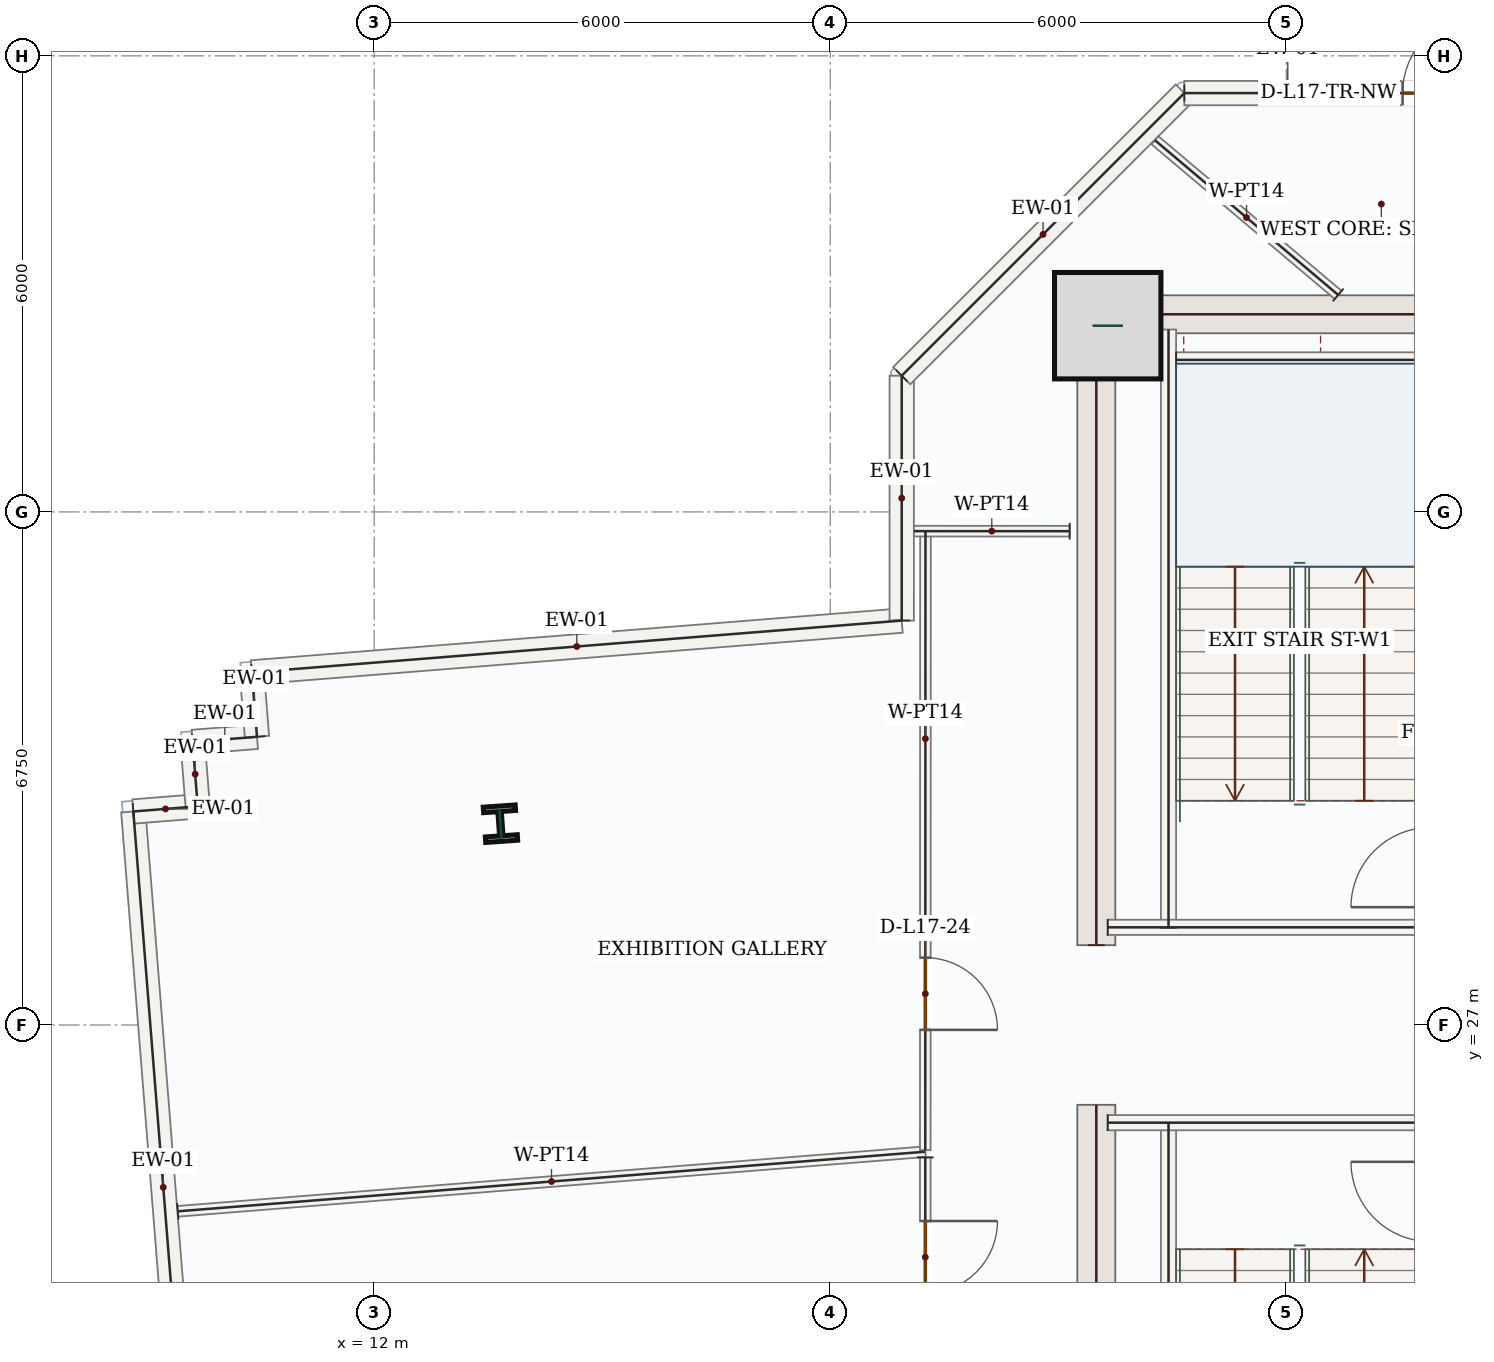
"""IFC4 building model, lengths in metres.
Left out: names, types, materials, properties, quantities, classifications, styles, units other than length and angle.
Written with IfcOpenShell. Run it as: python <this file> out.ifc"""

import sys

from ifc_helpers import new_model, si_unit, direction, frame, frame_2d, origin, origin_2d, place, context, subcontext, project, spatial, rectangle, i_section, extrude, source, transform, mapped, element, fill, save


model = new_model("IFC4")
c1 = context("Model", 3, precision=1e-05, world=origin(), true_north=direction((0.0, 1.0)))
c2 = subcontext(c1, "Body", "Model", "MODEL_VIEW")
j1 = project(units=[si_unit("LENGTHUNIT", "METRE"), si_unit("PLANEANGLEUNIT", "RADIAN")], contexts=[c1])
p1 = place(None, origin())
s1 = spatial("IfcSite", under=j1, at=p1, CompositionType="ELEMENT")
p2 = place(p1, origin())
s2 = spatial("IfcBuilding", under=s1, at=p2, CompositionType="ELEMENT")
p3 = place(p2, frame((0.0, 0.0, 79.5)))
s3 = spatial("IfcBuildingStorey", under=s2, at=p3, CompositionType="ELEMENT", Elevation=79.5)
m1 = source(origin(), c2, "Body", "SweptSolid", [
    extrude(rectangle(XDim=8.55, YDim=0.5, at=frame_2d((4.275, 0.0))), origin(), (0.0, 0.0, 1.0), 3.95),
])
for number, where, z_axis, x_axis in (
    (1, (21.5, 17.4, 0.0), (0.0, 0.0, 1.0), (0.0, 1.0, 0.0)),
    (2, (21.5, 28.05, 0.0), (0.0, 0.0, 1.0), (0.0, 1.0, 0.0)),
):
    element("IfcWall", number, at=place(p3, frame(where, z_axis=z_axis, x_axis=x_axis)), inside=s3, PredefinedType="SHEAR", context=c2, shape_type="MappedRepresentation", body=[
        mapped(m1, transform((0.0, 0.0, 0.0), x_axis=(1.0, 0.0, 0.0), y_axis=(0.0, 1.0, 0.0), z_axis=(0.0, 0.0, 1.0), scale=1.0)),
    ])
m2 = source(origin(), c2, "Body", "SweptSolid", [
    extrude(rectangle(XDim=7.0, YDim=0.5, at=frame_2d((3.5, 0.0))), origin(), (0.0, 0.0, 1.0), 3.95),
])
p4 = place(p3, frame((21.75, 36.35, 0.0), z_axis=(0.0, 0.0, 1.0), x_axis=(1.0, 0.0, 0.0)))
e3 = element("IfcWall", 3, at=p4, inside=s3, PredefinedType="SHEAR", context=c2, shape_type="MappedRepresentation", body=[
    mapped(m2, transform((0.0, 0.0, 0.0), x_axis=(1.0, 0.0, 0.0), y_axis=(0.0, 1.0, 0.0), z_axis=(0.0, 0.0, 1.0), scale=1.0)),
])
m3 = source(origin(), c2, "Body", "SweptSolid", [
    extrude(rectangle(XDim=1.4, YDim=1.4, at=origin_2d()), origin(), (0.0, 0.0, 1.0), 4.2),
])
p5 = place(p3, frame((21.65, 36.2, 0.0), z_axis=(0.0, 0.0, 1.0), x_axis=(1.0, 0.0, 0.0)))
e4 = element("IfcColumn", 4, at=p5, inside=s3, PredefinedType="COLUMN", context=c2, shape_type="MappedRepresentation", body=[
    mapped(m3, transform((0.0, 0.0, 0.0), x_axis=(1.0, 0.0, 0.0), y_axis=(0.0, 1.0, 0.0), z_axis=(0.0, 0.0, 1.0), scale=1.0)),
])
m4 = source(origin(), c2, "Body", "SweptSolid", [
    extrude(i_section(OverallWidth=0.421, OverallDepth=0.465, WebThickness=0.045, FlangeThickness=0.073, FilletRadius=0.018, at=origin_2d()), origin(), (0.0, 0.0, 1.0), 4.2),
])
p6 = place(p3, frame((13.661, 29.648, 0.0), z_axis=(0.0, 0.0, 1.0), x_axis=(0.99756405026, 0.069756473744, 0.0)))
e5 = element("IfcColumn", 5, at=p6, inside=s3, PredefinedType="COLUMN", context=c2, shape_type="MappedRepresentation", body=[
    mapped(m4, transform((0.0, 0.0, 0.0), x_axis=(1.0, 0.0, 0.0), y_axis=(0.0, 1.0, 0.0), z_axis=(0.0, 0.0, 1.0), scale=1.0)),
])
m5 = source(origin(), c2, "Body", "SweptSolid", [
    extrude(rectangle(XDim=9.92, YDim=0.32, at=frame_2d((4.96, 0.0))), origin(), (0.0, 0.0, 1.0), 3.95),
])
p7 = place(p3, frame((9.619, 19.92, 0.0), z_axis=(0.0, 0.0, 1.0), x_axis=(-0.07949480177, 0.996835280521, 0.0)))
e6 = element("IfcWall", 6, at=p7, inside=s3, PredefinedType="SOLIDWALL", context=c2, shape_type="MappedRepresentation", body=[
    mapped(m5, transform((0.0, 0.0, 0.0), x_axis=(1.0, 0.0, 0.0), y_axis=(0.0, 1.0, 0.0), z_axis=(0.0, 0.0, 1.0), scale=1.0)),
])
m6 = source(origin(), c2, "Body", "SweptSolid", [
    extrude(rectangle(XDim=0.85, YDim=0.32, at=frame_2d((0.425, 0.0))), origin(), (0.0, 0.0, 1.0), 3.95),
])
p8 = place(p3, frame((8.831, 29.809, 0.0), z_axis=(0.0, 0.0, 1.0), x_axis=(0.996828965123, 0.079573954853, 0.0)))
e7 = element("IfcWall", 7, at=p8, inside=s3, PredefinedType="SOLIDWALL", context=c2, shape_type="MappedRepresentation", body=[
    mapped(m6, transform((0.0, 0.0, 0.0), x_axis=(1.0, 0.0, 0.0), y_axis=(0.0, 1.0, 0.0), z_axis=(0.0, 0.0, 1.0), scale=1.0)),
])
m7 = source(origin(), c2, "Body", "SweptSolid", [
    extrude(rectangle(XDim=0.85, YDim=0.32, at=frame_2d((0.425, 0.0))), origin(), (0.0, 0.0, 1.0), 3.95),
])
for number, where, z_axis, x_axis in (
    (8, (9.678, 29.876, 0.0), (0.0, 0.0, 1.0), (-0.08, 0.997, 0.0)),
    (9, (9.61, 30.724, 0.0), (0.0, 0.0, 1.0), (0.997, 0.079, 0.0)),
    (10, (10.458, 30.791, 0.0), (0.0, 0.0, 1.0), (-0.08, 0.997, 0.0)),
):
    element("IfcWall", number, at=place(p3, frame(where, z_axis=z_axis, x_axis=x_axis)), inside=s3, PredefinedType="SOLIDWALL", context=c2, shape_type="MappedRepresentation", body=[
        mapped(m7, transform((0.0, 0.0, 0.0), x_axis=(1.0, 0.0, 0.0), y_axis=(0.0, 1.0, 0.0), z_axis=(0.0, 0.0, 1.0), scale=1.0)),
    ])
m8 = source(origin(), c2, "Body", "SweptSolid", [
    extrude(rectangle(XDim=8.577, YDim=0.32, at=frame_2d((4.289, 0.0))), origin(), (0.0, 0.0, 1.0), 3.95),
])
p9 = place(p3, frame((10.39, 31.639, 0.0), z_axis=(0.0, 0.0, 1.0), x_axis=(0.996834708052, 0.07950198, 0.0)))
e11 = element("IfcWall", 11, at=p9, inside=s3, PredefinedType="SOLIDWALL", context=c2, shape_type="MappedRepresentation", body=[
    mapped(m8, transform((0.0, 0.0, 0.0), x_axis=(1.0, 0.0, 0.0), y_axis=(0.0, 1.0, 0.0), z_axis=(0.0, 0.0, 1.0), scale=1.0)),
])
m9 = source(origin(), c2, "Body", "SweptSolid", [
    extrude(rectangle(XDim=3.221, YDim=0.32, at=frame_2d((1.611, 0.0))), origin(), (0.0, 0.0, 1.0), 3.95),
])
p10 = place(p3, frame((18.94, 32.321, 0.0), z_axis=(0.0, 0.0, 1.0), x_axis=(0.0, 1.0, 0.0)))
e12 = element("IfcWall", 12, at=p10, inside=s3, PredefinedType="SOLIDWALL", context=c2, shape_type="MappedRepresentation", body=[
    mapped(m9, transform((0.0, 0.0, 0.0), x_axis=(1.0, 0.0, 0.0), y_axis=(0.0, 1.0, 0.0), z_axis=(0.0, 0.0, 1.0), scale=1.0)),
])
m10 = source(origin(), c2, "Body", "SweptSolid", [
    extrude(rectangle(XDim=5.258, YDim=0.32, at=frame_2d((2.629, 0.0))), origin(), (0.0, 0.0, 1.0), 3.95),
])
p11 = place(p3, frame((18.94, 35.542, 0.0), z_axis=(0.0, 0.0, 1.0), x_axis=(0.707106781187, 0.707106781187, 0.0)))
e13 = element("IfcWall", 13, at=p11, inside=s3, PredefinedType="SOLIDWALL", context=c2, shape_type="MappedRepresentation", body=[
    mapped(m10, transform((0.0, 0.0, 0.0), x_axis=(1.0, 0.0, 0.0), y_axis=(0.0, 1.0, 0.0), z_axis=(0.0, 0.0, 1.0), scale=1.0)),
])
p12 = place(p3, frame((22.658, 39.26, 0.0), z_axis=(0.0, 0.0, 1.0), x_axis=(1.0, 0.0, 0.0)))
e14 = element("IfcWall", 14, at=p12, inside=s3, PredefinedType="SOLIDWALL", context=c2, shape_type="SweptSolid", body=[
    extrude(rectangle(XDim=5.683, YDim=0.32, at=frame_2d((2.842, 0.0))), origin(), (0.0, 0.0, 1.0), 3.95),
])
p13 = place(p12, frame((2.872, 0.0, 0.0)))
e15 = element("IfcOpeningElement", 15, at=p13, cuts=e14, PredefinedType="OPENING", context=c2, shape_type="SweptSolid", body=[
    extrude(rectangle(XDim=1.05, YDim=2.15, at=frame_2d((0.525, 1.075))), frame((0.0, 0.17, 0.0), z_axis=(0.0, -1.0, 0.0), x_axis=(1.0, 0.0, 0.0)), (0.0, 0.0, 1.0), 0.34),
])
m11 = source(origin(), c2, "Body", "SweptSolid", [
    extrude(rectangle(XDim=7.87, YDim=0.2, at=frame_2d((3.935, 0.0))), origin(), (0.0, 0.0, 1.0), 3.95),
])
for number, where, z_axis, x_axis in (
    (16, (22.45, 17.85, 0.0), (0.0, 0.0, 1.0), (0.0, 1.0, 0.0)),
    (17, (22.45, 28.28, 0.0), (0.0, 0.0, 1.0), (0.0, 1.0, 0.0)),
):
    element("IfcWall", number, at=place(p3, frame(where, z_axis=z_axis, x_axis=x_axis)), inside=s3, PredefinedType="SOLIDWALL", context=c2, shape_type="MappedRepresentation", body=[
        mapped(m11, transform((0.0, 0.0, 0.0), x_axis=(1.0, 0.0, 0.0), y_axis=(0.0, 1.0, 0.0), z_axis=(0.0, 0.0, 1.0), scale=1.0)),
    ])
m12 = source(origin(), c2, "Body", "SweptSolid", [
    extrude(rectangle(XDim=4.25, YDim=0.2, at=frame_2d((2.125, 0.0))), origin(), (0.0, 0.0, 1.0), 3.95),
])
for number, where, z_axis, x_axis in (
    (18, (21.65, 25.715, 0.0), (0.0, 0.0, 1.0), (1.0, 0.0, 0.0)),
    (19, (21.65, 28.285, 0.0), (0.0, 0.0, 1.0), (1.0, 0.0, 0.0)),
):
    element("IfcWall", number, at=place(p3, frame(where, z_axis=z_axis, x_axis=x_axis)), inside=s3, PredefinedType="SOLIDWALL", context=c2, shape_type="MappedRepresentation", body=[
        mapped(m12, transform((0.0, 0.0, 0.0), x_axis=(1.0, 0.0, 0.0), y_axis=(0.0, 1.0, 0.0), z_axis=(0.0, 0.0, 1.0), scale=1.0)),
    ])
m13 = source(origin(), c2, "Body", "SweptSolid", [
    extrude(rectangle(XDim=3.25, YDim=0.2, at=frame_2d((1.625, 0.0))), origin(), (0.0, 0.0, 1.0), 3.95),
])
p14 = place(p3, frame((22.55, 35.75, 0.0), z_axis=(0.0, 0.0, 1.0), x_axis=(1.0, 0.0, 0.0)))
e20 = element("IfcWall", 20, at=p14, inside=s3, PredefinedType="SOLIDWALL", context=c2, shape_type="MappedRepresentation", body=[
    mapped(m13, transform((0.0, 0.0, 0.0), x_axis=(1.0, 0.0, 0.0), y_axis=(0.0, 1.0, 0.0), z_axis=(0.0, 0.0, 1.0), scale=1.0)),
])
m14 = source(origin(), c2, "Body", "SweptSolid", [
    extrude(rectangle(XDim=3.155, YDim=0.14, at=frame_2d((1.577, 0.0))), origin(), (0.0, 0.0, 1.0), 3.95),
])
p15 = place(p3, frame((24.682, 36.605, 0.0), z_axis=(0.0, 0.0, 1.0), x_axis=(-0.76411384058, 0.645081420159, 0.0)))
e21 = element("IfcWall", 21, at=p15, inside=s3, PredefinedType="PARTITIONING", context=c2, shape_type="MappedRepresentation", body=[
    mapped(m14, transform((0.0, 0.0, 0.0), x_axis=(1.0, 0.0, 0.0), y_axis=(0.0, 1.0, 0.0), z_axis=(0.0, 0.0, 1.0), scale=1.0)),
])
m15 = source(origin(), c2, "Body", "SweptSolid", [
    extrude(rectangle(XDim=9.865, YDim=0.14, at=frame_2d((4.933, 0.0))), origin(), (0.0, 0.0, 1.0), 3.95),
])
p16 = place(p3, frame((9.416, 24.549, 0.0), z_axis=(0.0, 0.0, 1.0), x_axis=(0.996833900052, 0.079512110446, 0.0)))
e22 = element("IfcWall", 22, at=p16, inside=s3, PredefinedType="PARTITIONING", context=c2, shape_type="MappedRepresentation", body=[
    mapped(m15, transform((0.0, 0.0, 0.0), x_axis=(1.0, 0.0, 0.0), y_axis=(0.0, 1.0, 0.0), z_axis=(0.0, 0.0, 1.0), scale=1.0)),
])
p17 = place(p3, frame((19.25, 25.258, 0.0), z_axis=(0.0, 0.0, 1.0), x_axis=(0.000102701037, -0.999999994726, 0.0)))
e23 = element("IfcWall", 23, at=p17, inside=s3, PredefinedType="PARTITIONING", context=c2, shape_type="SweptSolid", body=[
    extrude(rectangle(XDim=4.754, YDim=0.14, at=frame_2d((2.377, 0.0))), origin(), (0.0, 0.0, 1.0), 3.95),
])
p18 = place(p17, frame((0.837, 0.0, 0.0)))
e24 = element("IfcOpeningElement", 24, at=p18, cuts=e23, PredefinedType="OPENING", context=c2, shape_type="SweptSolid", body=[
    extrude(rectangle(XDim=0.95, YDim=2.15, at=frame_2d((0.475, 1.075))), frame((0.0, 0.08, 0.0), z_axis=(0.0, -1.0, 0.0), x_axis=(1.0, 0.0, 0.0)), (0.0, 0.0, 1.0), 0.16),
])
p19 = place(p3, frame((19.253, 33.497, 0.0), z_axis=(0.0, 0.0, 1.0), x_axis=(-0.000329746078, -0.999999945634, 0.0)))
e25 = element("IfcWall", 25, at=p19, inside=s3, PredefinedType="PARTITIONING", context=c2, shape_type="SweptSolid", body=[
    extrude(rectangle(XDim=8.144, YDim=0.14, at=frame_2d((4.072, 0.0))), origin(), (0.0, 0.0, 1.0), 3.95),
])
p20 = place(p19, frame((5.611, 0.0, 0.0)))
e26 = element("IfcOpeningElement", 26, at=p20, cuts=e25, PredefinedType="OPENING", context=c2, shape_type="SweptSolid", body=[
    extrude(rectangle(XDim=0.95, YDim=2.15, at=frame_2d((0.475, 1.075))), frame((0.0, 0.08, 0.0), z_axis=(0.0, -1.0, 0.0), x_axis=(1.0, 0.0, 0.0)), (0.0, 0.0, 1.0), 0.16),
])
m16 = source(origin(), c2, "Body", "SweptSolid", [
    extrude(rectangle(XDim=2.049, YDim=0.14, at=frame_2d((1.025, 0.0))), origin(), (0.0, 0.0, 1.0), 3.95),
])
p21 = place(p3, frame((21.149, 33.497, 0.0), z_axis=(0.0, 0.0, 1.0), x_axis=(-0.999999936133, 0.000357398119, 0.0)))
e27 = element("IfcWall", 27, at=p21, inside=s3, PredefinedType="PARTITIONING", context=c2, shape_type="MappedRepresentation", body=[
    mapped(m16, transform((0.0, 0.0, 0.0), x_axis=(1.0, 0.0, 0.0), y_axis=(0.0, 1.0, 0.0), z_axis=(0.0, 0.0, 1.0), scale=1.0)),
])
m17 = source(origin(), c2, "Body", "SweptSolid", [
    extrude(rectangle(XDim=1.05, YDim=2.15, at=frame_2d((0.525, 1.075))), frame((0.0, 0.025, 0.0), z_axis=(0.0, -1.0, 0.0), x_axis=(1.0, 0.0, 0.0)), (0.0, 0.0, 1.0), 0.05),
])
p22 = place(p13, origin())
e28 = element("IfcDoor", 28, at=p22, inside=s3, OperationType="SINGLE_SWING_RIGHT", PredefinedType="DOOR", context=c2, shape_type="MappedRepresentation", body=[
    mapped(m17, transform((0.0, 0.0, 0.0), x_axis=(1.0, 0.0, 0.0), y_axis=(0.0, 1.0, 0.0), z_axis=(0.0, 0.0, 1.0), scale=1.0)),
])
fill(e15, e28)
m18 = source(origin(), c2, "Body", "SweptSolid", [
    extrude(rectangle(XDim=0.95, YDim=2.15, at=frame_2d((0.475, 1.075))), frame((0.0, 0.025, 0.0), z_axis=(0.0, -1.0, 0.0), x_axis=(1.0, 0.0, 0.0)), (0.0, 0.0, 1.0), 0.05),
])
p23 = place(p20, origin())
e29 = element("IfcDoor", 29, at=p23, inside=s3, OperationType="SINGLE_SWING_RIGHT", PredefinedType="DOOR", context=c2, shape_type="MappedRepresentation", body=[
    mapped(m18, transform((0.0, 0.0, 0.0), x_axis=(1.0, 0.0, 0.0), y_axis=(0.0, 1.0, 0.0), z_axis=(0.0, 0.0, 1.0), scale=1.0)),
])
fill(e26, e29)
p24 = place(p18, origin())
e30 = element("IfcDoor", 30, at=p24, inside=s3, OperationType="SINGLE_SWING_LEFT", PredefinedType="DOOR", context=c2, shape_type="MappedRepresentation", body=[
    mapped(m18, transform((0.0, 0.0, 0.0), x_axis=(1.0, 0.0, 0.0), y_axis=(0.0, 1.0, 0.0), z_axis=(0.0, 0.0, 1.0), scale=1.0)),
])
fill(e24, e30)
save(model, sys.argv[1])
